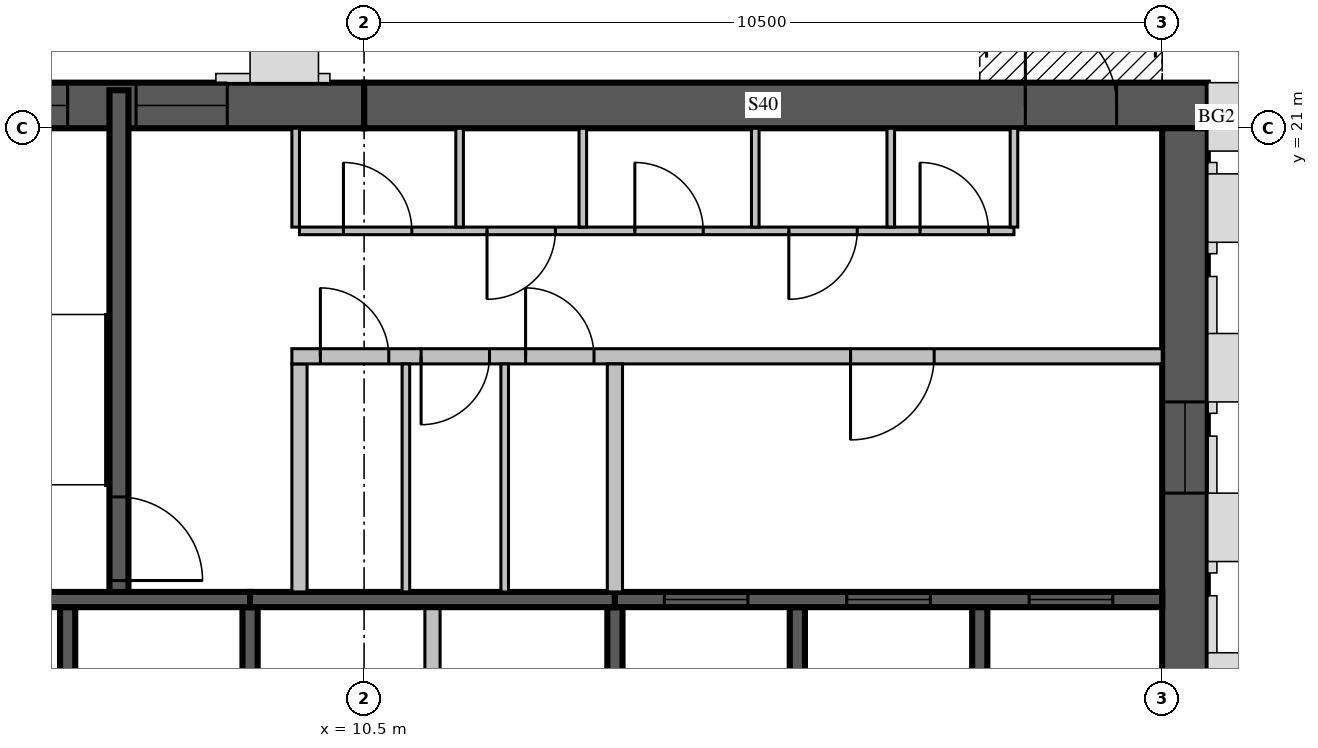
"""IFC4 building model, lengths in metres.
Left out: names, types, materials, properties, quantities, classifications, styles, units other than length and angle.
Written with IfcOpenShell. Run it as: python <this file> out.ifc"""

import sys

from ifc_helpers import new_model, si_unit, direction, frame, frame_2d, origin, place, context, subcontext, project, spatial, rectangle, extrude, source, transform, mapped, element, fill, save


model = new_model("IFC4")
c1 = context("Model", 3, precision=1e-05, world=origin(), true_north=direction((0.0, 1.0)))
c2 = subcontext(c1, "Body", "Model", "MODEL_VIEW")
j1 = project(units=[si_unit("LENGTHUNIT", "METRE"), si_unit("PLANEANGLEUNIT", "RADIAN")], contexts=[c1])
p1 = place(None, origin())
s1 = spatial("IfcSite", under=j1, at=p1, CompositionType="ELEMENT")
p2 = place(p1, origin())
s2 = spatial("IfcBuilding", under=s1, at=p2, CompositionType="ELEMENT")
p3 = place(p2, frame((0.0, 0.0, 316.0)))
s3 = spatial("IfcBuildingStorey", under=s2, at=p3, CompositionType="ELEMENT", Elevation=316.0)
m1 = source(origin(), c2, "Body", "SweptSolid", [
    extrude(rectangle(XDim=11.1, YDim=0.6, at=frame_2d((5.55, 0.0))), origin(), (0.0, 0.0, 1.0), 3.5),
])
p4 = place(p3, frame((10.5, 21.3, 0.0), z_axis=(0.0, 0.0, 1.0), x_axis=(1.0, 0.0, 0.0)))
e1 = element("IfcWall", 1, at=p4, inside=s3, PredefinedType="SHEAR", context=c2, shape_type="MappedRepresentation", body=[
    mapped(m1, transform((0.0, 0.0, 0.0), scale=1.0)),
])
m2 = source(origin(), c2, "Body", "SweptSolid", [
    extrude(rectangle(XDim=1.2, YDim=2.1, at=frame_2d((0.6, 1.05))), frame((0.0, 0.31, 0.0), z_axis=(0.0, -1.0, 0.0), x_axis=(1.0, 0.0, 0.0)), (0.0, 0.0, 1.0), 0.62),
])
p5 = place(p4, frame((8.7, 0.0, 0.0)))
e2 = element("IfcOpeningElement", 2, at=p5, cuts=e1, PredefinedType="OPENING", context=c2, shape_type="MappedRepresentation", body=[
    mapped(m2, transform((0.0, 0.0, 0.0), scale=1.0)),
])
m3 = source(origin(), c2, "Body", "SweptSolid", [
    extrude(rectangle(XDim=10.5, YDim=0.6, at=frame_2d((5.25, 0.0))), origin(), (0.0, 0.0, 1.0), 3.5),
])
p6 = place(p3, frame((21.3, 10.5, 0.0), z_axis=(0.0, 0.0, 1.0), x_axis=(0.0, 1.0, 0.0)))
e3 = element("IfcWall", 3, at=p6, inside=s3, PredefinedType="SHEAR", context=c2, shape_type="MappedRepresentation", body=[
    mapped(m3, transform((0.0, 0.0, 0.0), scale=1.0)),
])
m4 = source(origin(), c2, "Body", "SweptSolid", [
    extrude(rectangle(XDim=1.2, YDim=2.4, at=frame_2d((0.6, 1.2))), frame((0.0, 0.31, 0.0), z_axis=(0.0, -1.0, 0.0), x_axis=(1.0, 0.0, 0.0)), (0.0, 0.0, 1.0), 0.62),
])
p7 = place(p6, frame((5.7, 0.0, 0.6)))
e4 = element("IfcOpeningElement", 4, at=p7, cuts=e3, PredefinedType="OPENING", context=c2, shape_type="MappedRepresentation", body=[
    mapped(m4, transform((0.0, 0.0, 0.0), scale=1.0)),
])
m5 = source(origin(), c2, "Body", "SweptSolid", [
    extrude(rectangle(XDim=6.6, YDim=0.6, at=frame_2d((3.3, 0.0))), origin(), (0.0, 0.0, 1.0), 3.5),
])
p8 = place(p3, frame((3.9, 21.3, 0.0), z_axis=(0.0, 0.0, 1.0), x_axis=(1.0, 0.0, 0.0)))
e5 = element("IfcWall", 5, at=p8, inside=s3, PredefinedType="SHEAR", context=c2, shape_type="MappedRepresentation", body=[
    mapped(m5, transform((0.0, 0.0, 0.0), scale=1.0)),
])
p9 = place(p8, frame((1.5, 0.0, 0.6)))
e6 = element("IfcOpeningElement", 6, at=p9, cuts=e5, PredefinedType="OPENING", context=c2, shape_type="MappedRepresentation", body=[
    mapped(m4, transform((0.0, 0.0, 0.0), scale=1.0)),
])
p10 = place(p8, frame((3.6, 0.0, 0.6)))
e7 = element("IfcOpeningElement", 7, at=p10, cuts=e5, PredefinedType="OPENING", context=c2, shape_type="MappedRepresentation", body=[
    mapped(m4, transform((0.0, 0.0, 0.0), scale=1.0)),
])
m6 = source(origin(), c2, "Body", "SweptSolid", [
    extrude(rectangle(XDim=3.0, YDim=0.2, at=frame_2d((1.5, 0.0))), origin(), (0.0, 0.0, 1.0), 3.5),
])
p11 = place(p3, frame((6.6, 11.7, 0.0), z_axis=(0.0, 0.0, 1.0), x_axis=(0.0, 1.0, 0.0)))
e8 = element("IfcWall", 8, at=p11, inside=s3, PredefinedType="SOLIDWALL", context=c2, shape_type="MappedRepresentation", body=[
    mapped(m6, transform((0.0, 0.0, 0.0), scale=1.0)),
])
m7 = source(origin(), c2, "Body", "SweptSolid", [
    extrude(rectangle(XDim=3.0, YDim=0.2, at=frame_2d((1.5, 0.0))), origin(), (0.0, 0.0, 1.0), 3.1),
])
for number, where, z_axis, x_axis in (
    (9, (9.0, 11.7, 0.0), (0.0, 0.0, 1.0), (0.0, 1.0, 0.0)),
    (10, (13.8, 11.7, 0.0), (0.0, 0.0, 1.0), (0.0, 1.0, 0.0)),
):
    element("IfcWall", number, at=place(p3, frame(where, z_axis=z_axis, x_axis=x_axis)), inside=s3, PredefinedType="SOLIDWALL", context=c2, shape_type="MappedRepresentation", body=[
        mapped(m7, transform((0.0, 0.0, 0.0), scale=1.0)),
    ])
for number, where, z_axis, x_axis in (
    (11, (16.2, 11.7, 0.0), (0.0, 0.0, 1.0), (0.0, 1.0, 0.0)),
    (12, (18.6, 11.7, 0.0), (0.0, 0.0, 1.0), (0.0, 1.0, 0.0)),
):
    element("IfcWall", number, at=place(p3, frame(where, z_axis=z_axis, x_axis=x_axis)), inside=s3, PredefinedType="SOLIDWALL", context=c2, shape_type="MappedRepresentation", body=[
        mapped(m6, transform((0.0, 0.0, 0.0), scale=1.0)),
    ])
m8 = source(origin(), c2, "Body", "SweptSolid", [
    extrude(rectangle(XDim=3.0, YDim=0.2, at=frame_2d((1.5, 0.0))), origin(), (0.0, 0.0, 1.0), 3.1),
])
p12 = place(p3, frame((11.4, 11.7, 0.0), z_axis=(0.0, 0.0, 1.0), x_axis=(0.0, 1.0, 0.0)))
e13 = element("IfcWall", 13, at=p12, inside=s3, PredefinedType="PARTITIONING", context=c2, shape_type="MappedRepresentation", body=[
    mapped(m8, transform((0.0, 0.0, 0.0), scale=1.0)),
])
m9 = source(origin(), c2, "Body", "SweptSolid", [
    extrude(rectangle(XDim=4.8, YDim=0.2, at=frame_2d((2.4, 0.0))), origin(), (0.0, 0.0, 1.0), 3.5),
])
p13 = place(p3, frame((4.2, 14.8, 0.0), z_axis=(0.0, 0.0, 1.0), x_axis=(1.0, 0.0, 0.0)))
e14 = element("IfcWall", 14, at=p13, inside=s3, PredefinedType="SOLIDWALL", context=c2, shape_type="MappedRepresentation", body=[
    mapped(m9, transform((0.0, 0.0, 0.0), scale=1.0)),
])
m10 = source(origin(), c2, "Body", "SweptSolid", [
    extrude(rectangle(XDim=4.8, YDim=0.2, at=frame_2d((2.4, 0.0))), origin(), (0.0, 0.0, 1.0), 3.1),
])
p14 = place(p3, frame((9.0, 14.8, 0.0), z_axis=(0.0, 0.0, 1.0), x_axis=(1.0, 0.0, 0.0)))
e15 = element("IfcWall", 15, at=p14, inside=s3, PredefinedType="SOLIDWALL", context=c2, shape_type="MappedRepresentation", body=[
    mapped(m10, transform((0.0, 0.0, 0.0), scale=1.0)),
])
m11 = source(origin(), c2, "Body", "SweptSolid", [
    extrude(rectangle(XDim=7.2, YDim=0.2, at=frame_2d((3.6, 0.0))), origin(), (0.0, 0.0, 1.0), 3.5),
])
p15 = place(p3, frame((13.8, 14.8, 0.0), z_axis=(0.0, 0.0, 1.0), x_axis=(1.0, 0.0, 0.0)))
e16 = element("IfcWall", 16, at=p15, inside=s3, PredefinedType="SOLIDWALL", context=c2, shape_type="MappedRepresentation", body=[
    mapped(m11, transform((0.0, 0.0, 0.0), scale=1.0)),
])
m12 = source(origin(), c2, "Body", "SweptSolid", [
    extrude(rectangle(XDim=1.1, YDim=2.1, at=frame_2d((0.55, 1.05))), frame((0.0, 0.11, 0.0), z_axis=(0.0, -1.0, 0.0), x_axis=(1.0, 0.0, 0.0)), (0.0, 0.0, 1.0), 0.22),
])
p16 = place(p15, frame((0.65, 0.0, 0.0)))
e17 = element("IfcOpeningElement", 17, at=p16, cuts=e16, PredefinedType="OPENING", context=c2, shape_type="MappedRepresentation", body=[
    mapped(m12, transform((0.0, 0.0, 0.0), scale=1.0)),
])
p17 = place(p15, frame((3.05, 0.0, 0.0)))
e18 = element("IfcOpeningElement", 18, at=p17, cuts=e16, PredefinedType="OPENING", context=c2, shape_type="MappedRepresentation", body=[
    mapped(m12, transform((0.0, 0.0, 0.0), scale=1.0)),
])
p18 = place(p15, frame((5.45, 0.0, 0.0)))
e19 = element("IfcOpeningElement", 19, at=p18, cuts=e16, PredefinedType="OPENING", context=c2, shape_type="MappedRepresentation", body=[
    mapped(m12, transform((0.0, 0.0, 0.0), scale=1.0)),
])
m13 = source(origin(), c2, "Body", "SweptSolid", [
    extrude(rectangle(XDim=6.6, YDim=0.25, at=frame_2d((3.3, 0.0))), origin(), (0.0, 0.0, 1.0), 3.1),
])
p19 = place(p3, frame((7.275, 14.9, 0.0), z_axis=(0.0, 0.0, 1.0), x_axis=(0.0, 1.0, 0.0)))
e20 = element("IfcWall", 20, at=p19, inside=s3, PredefinedType="SOLIDWALL", context=c2, shape_type="MappedRepresentation", body=[
    mapped(m13, transform((0.0, 0.0, 0.0), scale=1.0)),
])
m14 = source(origin(), c2, "Body", "SweptSolid", [
    extrude(rectangle(XDim=1.1, YDim=2.1, at=frame_2d((0.55, 1.05))), frame((0.0, 0.135, 0.0), z_axis=(0.0, -1.0, 0.0), x_axis=(1.0, 0.0, 0.0)), (0.0, 0.0, 1.0), 0.27),
])
p20 = place(p19, frame((0.15, 0.0, 0.0)))
e21 = element("IfcOpeningElement", 21, at=p20, cuts=e20, PredefinedType="OPENING", context=c2, shape_type="MappedRepresentation", body=[
    mapped(m14, transform((0.0, 0.0, 0.0), scale=1.0)),
])
p21 = place(p3, frame((9.65, 14.9, 0.0), z_axis=(0.0, 0.0, 1.0), x_axis=(0.0, 1.0, 0.0)))
e22 = element("IfcWall", 22, at=p21, inside=s3, PredefinedType="PARTITIONING", context=c2, shape_type="MappedRepresentation", body=[
    mapped(m8, transform((0.0, 0.0, 0.0), scale=1.0)),
])
m15 = source(origin(), c2, "Body", "SweptSolid", [
    extrude(rectangle(XDim=11.45, YDim=0.2, at=frame_2d((5.725, 0.0))), origin(), (0.0, 0.0, 1.0), 3.1),
])
p22 = place(p3, frame((9.55, 18.0, 0.0), z_axis=(0.0, 0.0, 1.0), x_axis=(1.0, 0.0, 0.0)))
e23 = element("IfcWall", 23, at=p22, inside=s3, PredefinedType="PARTITIONING", context=c2, shape_type="MappedRepresentation", body=[
    mapped(m15, transform((0.0, 0.0, 0.0), scale=1.0)),
])
m16 = source(origin(), c2, "Body", "SweptSolid", [
    extrude(rectangle(XDim=0.9, YDim=2.1, at=frame_2d((0.45, 1.05))), frame((0.0, 0.11, 0.0), z_axis=(0.0, -1.0, 0.0), x_axis=(1.0, 0.0, 0.0)), (0.0, 0.0, 1.0), 0.22),
])
p23 = place(p22, frame((0.375, 0.0, 0.0)))
e24 = element("IfcOpeningElement", 24, at=p23, cuts=e23, PredefinedType="OPENING", context=c2, shape_type="MappedRepresentation", body=[
    mapped(m16, transform((0.0, 0.0, 0.0), scale=1.0)),
])
p24 = place(p22, frame((1.7, 0.0, 0.0)))
e25 = element("IfcOpeningElement", 25, at=p24, cuts=e23, PredefinedType="OPENING", context=c2, shape_type="MappedRepresentation", body=[
    mapped(m16, transform((0.0, 0.0, 0.0), scale=1.0)),
])
p25 = place(p22, frame((3.075, 0.0, 0.0)))
e26 = element("IfcOpeningElement", 26, at=p25, cuts=e23, PredefinedType="OPENING", context=c2, shape_type="MappedRepresentation", body=[
    mapped(m16, transform((0.0, 0.0, 0.0), scale=1.0)),
])
p26 = place(p22, frame((7.35, 0.0, 0.0)))
e27 = element("IfcOpeningElement", 27, at=p26, cuts=e23, PredefinedType="OPENING", context=c2, shape_type="MappedRepresentation", body=[
    mapped(m12, transform((0.0, 0.0, 0.0), scale=1.0)),
])
m17 = source(origin(), c2, "Body", "SweptSolid", [
    extrude(rectangle(XDim=9.4, YDim=0.1, at=frame_2d((4.7, 0.0))), origin(), (0.0, 0.0, 1.0), 3.1),
])
p27 = place(p3, frame((9.65, 19.65, 0.0), z_axis=(0.0, 0.0, 1.0), x_axis=(1.0, 0.0, 0.0)))
e28 = element("IfcWall", 28, at=p27, inside=s3, PredefinedType="PARTITIONING", context=c2, shape_type="MappedRepresentation", body=[
    mapped(m17, transform((0.0, 0.0, 0.0), scale=1.0)),
])
m18 = source(origin(), c2, "Body", "SweptSolid", [
    extrude(rectangle(XDim=0.9, YDim=2.1, at=frame_2d((0.45, 1.05))), frame((0.0, 0.06, 0.0), z_axis=(0.0, -1.0, 0.0), x_axis=(1.0, 0.0, 0.0)), (0.0, 0.0, 1.0), 0.12),
])
p28 = place(p27, frame((0.578, 0.0, 0.0)))
e29 = element("IfcOpeningElement", 29, at=p28, cuts=e28, PredefinedType="OPENING", context=c2, shape_type="MappedRepresentation", body=[
    mapped(m18, transform((0.0, 0.0, 0.0), scale=1.0)),
])
p29 = place(p27, frame((2.467, 0.0, 0.0)))
e30 = element("IfcOpeningElement", 30, at=p29, cuts=e28, PredefinedType="OPENING", context=c2, shape_type="MappedRepresentation", body=[
    mapped(m18, transform((0.0, 0.0, 0.0), scale=1.0)),
])
p30 = place(p27, frame((4.412, 0.0, 0.0)))
e31 = element("IfcOpeningElement", 31, at=p30, cuts=e28, PredefinedType="OPENING", context=c2, shape_type="MappedRepresentation", body=[
    mapped(m18, transform((0.0, 0.0, 0.0), scale=1.0)),
])
p31 = place(p27, frame((6.438, 0.0, 0.0)))
e32 = element("IfcOpeningElement", 32, at=p31, cuts=e28, PredefinedType="OPENING", context=c2, shape_type="MappedRepresentation", body=[
    mapped(m18, transform((0.0, 0.0, 0.0), scale=1.0)),
])
p32 = place(p27, frame((8.165, 0.0, 0.0)))
e33 = element("IfcOpeningElement", 33, at=p32, cuts=e28, PredefinedType="OPENING", context=c2, shape_type="MappedRepresentation", body=[
    mapped(m18, transform((0.0, 0.0, 0.0), scale=1.0)),
])
m19 = source(origin(), c2, "Body", "SweptSolid", [
    extrude(rectangle(XDim=1.3, YDim=0.1, at=frame_2d((0.65, 0.0))), origin(), (0.0, 0.0, 1.0), 3.1),
])
for number, where, z_axis, x_axis in (
    (34, (11.757, 19.7, 0.0), (0.0, 0.0, 1.0), (0.0, 1.0, 0.0)),
    (35, (13.378, 19.7, 0.0), (0.0, 0.0, 1.0), (0.0, 1.0, 0.0)),
    (36, (15.647, 19.7, 0.0), (0.0, 0.0, 1.0), (0.0, 1.0, 0.0)),
    (37, (17.429, 19.7, 0.0), (0.0, 0.0, 1.0), (0.0, 1.0, 0.0)),
    (38, (9.6, 19.7, 0.0), (0.0, 0.0, 1.0), (0.0, 1.0, 0.0)),
    (39, (19.05, 19.7, 0.0), (0.0, 0.0, 1.0), (0.0, 1.0, 0.0)),
):
    element("IfcWall", number, at=place(p3, frame(where, z_axis=z_axis, x_axis=x_axis)), inside=s3, PredefinedType="PARTITIONING", context=c2, shape_type="MappedRepresentation", body=[
        mapped(m19, transform((0.0, 0.0, 0.0), scale=1.0)),
    ])
p33 = place(p3, frame((13.8, 14.9, 0.0), z_axis=(0.0, 0.0, 1.0), x_axis=(0.0, 1.0, 0.0)))
e40 = element("IfcWall", 40, at=p33, inside=s3, PredefinedType="PARTITIONING", context=c2, shape_type="MappedRepresentation", body=[
    mapped(m8, transform((0.0, 0.0, 0.0), scale=1.0)),
])
m20 = source(origin(), c2, "Body", "SweptSolid", [
    extrude(rectangle(XDim=3.0, YDim=0.1, at=frame_2d((1.5, 0.0))), origin(), (0.0, 0.0, 1.0), 3.1),
])
for number, where, z_axis, x_axis in (
    (41, (11.05, 14.9, 0.0), (0.0, 0.0, 1.0), (0.0, 1.0, 0.0)),
    (42, (12.35, 14.9, 0.0), (0.0, 0.0, 1.0), (0.0, 1.0, 0.0)),
):
    element("IfcWall", number, at=place(p3, frame(where, z_axis=z_axis, x_axis=x_axis)), inside=s3, PredefinedType="PARTITIONING", context=c2, shape_type="MappedRepresentation", body=[
        mapped(m20, transform((0.0, 0.0, 0.0), scale=1.0)),
    ])
m21 = source(origin(), c2, "Body", "SweptSolid", [
    extrude(rectangle(XDim=1.1, YDim=2.1, at=frame_2d((0.55, 1.05))), frame((0.0, 0.025, 0.0), z_axis=(0.0, -1.0, 0.0), x_axis=(1.0, 0.0, 0.0)), (0.0, 0.0, 1.0), 0.05),
])
p34 = place(p16, origin())
e43 = element("IfcDoor", 43, at=p34, inside=s3, OperationType="SLIDING_TO_LEFT", PredefinedType="DOOR", context=c2, shape_type="MappedRepresentation", body=[
    mapped(m21, transform((0.0, 0.0, 0.0), scale=1.0)),
])
fill(e17, e43)
p35 = place(p17, origin())
e44 = element("IfcDoor", 44, at=p35, inside=s3, OperationType="SLIDING_TO_LEFT", PredefinedType="DOOR", context=c2, shape_type="MappedRepresentation", body=[
    mapped(m21, transform((0.0, 0.0, 0.0), scale=1.0)),
])
fill(e18, e44)
p36 = place(p18, origin())
e45 = element("IfcDoor", 45, at=p36, inside=s3, OperationType="SLIDING_TO_LEFT", PredefinedType="DOOR", context=c2, shape_type="MappedRepresentation", body=[
    mapped(m21, transform((0.0, 0.0, 0.0), scale=1.0)),
])
fill(e19, e45)
p37 = place(p20, origin())
e46 = element("IfcDoor", 46, at=p37, inside=s3, OperationType="SINGLE_SWING_RIGHT", PredefinedType="DOOR", context=c2, shape_type="MappedRepresentation", body=[
    mapped(m21, transform((0.0, 0.0, 0.0), scale=1.0)),
])
fill(e21, e46)
m22 = source(origin(), c2, "Body", "SweptSolid", [
    extrude(rectangle(XDim=0.9, YDim=2.1, at=frame_2d((0.45, 1.05))), frame((0.0, 0.025, 0.0), z_axis=(0.0, -1.0, 0.0), x_axis=(1.0, 0.0, 0.0)), (0.0, 0.0, 1.0), 0.05),
])
p38 = place(p23, origin())
e47 = element("IfcDoor", 47, at=p38, inside=s3, OperationType="SINGLE_SWING_LEFT", PredefinedType="DOOR", context=c2, shape_type="MappedRepresentation", body=[
    mapped(m22, transform((0.0, 0.0, 0.0), scale=1.0)),
])
fill(e24, e47)
p39 = place(p24, origin())
e48 = element("IfcDoor", 48, at=p39, inside=s3, OperationType="SINGLE_SWING_RIGHT", PredefinedType="DOOR", context=c2, shape_type="MappedRepresentation", body=[
    mapped(m22, transform((0.0, 0.0, 0.0), scale=1.0)),
])
fill(e25, e48)
p40 = place(p25, origin())
e49 = element("IfcDoor", 49, at=p40, inside=s3, OperationType="SINGLE_SWING_LEFT", PredefinedType="DOOR", context=c2, shape_type="MappedRepresentation", body=[
    mapped(m22, transform((0.0, 0.0, 0.0), scale=1.0)),
])
fill(e26, e49)
p41 = place(p26, origin())
e50 = element("IfcDoor", 50, at=p41, inside=s3, OperationType="SINGLE_SWING_RIGHT", PredefinedType="DOOR", context=c2, shape_type="MappedRepresentation", body=[
    mapped(m21, transform((0.0, 0.0, 0.0), scale=1.0)),
])
fill(e27, e50)
p42 = place(p28, origin())
e51 = element("IfcDoor", 51, at=p42, inside=s3, OperationType="SINGLE_SWING_LEFT", PredefinedType="DOOR", context=c2, shape_type="MappedRepresentation", body=[
    mapped(m22, transform((0.0, 0.0, 0.0), scale=1.0)),
])
fill(e29, e51)
p43 = place(p29, origin())
e52 = element("IfcDoor", 52, at=p43, inside=s3, OperationType="SINGLE_SWING_RIGHT", PredefinedType="DOOR", context=c2, shape_type="MappedRepresentation", body=[
    mapped(m22, transform((0.0, 0.0, 0.0), scale=1.0)),
])
fill(e30, e52)
p44 = place(p30, origin())
e53 = element("IfcDoor", 53, at=p44, inside=s3, OperationType="SINGLE_SWING_LEFT", PredefinedType="DOOR", context=c2, shape_type="MappedRepresentation", body=[
    mapped(m22, transform((0.0, 0.0, 0.0), scale=1.0)),
])
fill(e31, e53)
p45 = place(p31, origin())
e54 = element("IfcDoor", 54, at=p45, inside=s3, OperationType="SINGLE_SWING_RIGHT", PredefinedType="DOOR", context=c2, shape_type="MappedRepresentation", body=[
    mapped(m22, transform((0.0, 0.0, 0.0), scale=1.0)),
])
fill(e32, e54)
p46 = place(p32, origin())
e55 = element("IfcDoor", 55, at=p46, inside=s3, OperationType="SINGLE_SWING_LEFT", PredefinedType="DOOR", context=c2, shape_type="MappedRepresentation", body=[
    mapped(m22, transform((0.0, 0.0, 0.0), scale=1.0)),
])
fill(e33, e55)
m23 = source(origin(), c2, "Body", "SweptSolid", [
    extrude(rectangle(XDim=1.2, YDim=2.1, at=frame_2d((0.6, 1.05))), frame((0.0, 0.025, 0.0), z_axis=(0.0, -1.0, 0.0), x_axis=(1.0, 0.0, 0.0)), (0.0, 0.0, 1.0), 0.05),
])
p47 = place(p5, origin())
e56 = element("IfcDoor", 56, at=p47, inside=s3, OperationType="SINGLE_SWING_LEFT", PredefinedType="DOOR", context=c2, shape_type="MappedRepresentation", body=[
    mapped(m23, transform((0.0, 0.0, 0.0), scale=1.0)),
])
fill(e2, e56)
m24 = source(origin(), c2, "Body", "SweptSolid", [
    extrude(rectangle(XDim=1.2, YDim=2.4, at=frame_2d((0.6, 1.2))), frame((0.0, 0.03, 0.0), z_axis=(0.0, -1.0, 0.0), x_axis=(1.0, 0.0, 0.0)), (0.0, 0.0, 1.0), 0.06),
])
p48 = place(p7, origin())
e57 = element("IfcWindow", 57, at=p48, inside=s3, PartitioningType="SINGLE_PANEL", PredefinedType="WINDOW", context=c2, shape_type="MappedRepresentation", body=[
    mapped(m24, transform((0.0, 0.0, 0.0), scale=1.0)),
])
fill(e4, e57)
p49 = place(p9, origin())
e58 = element("IfcWindow", 58, at=p49, inside=s3, PartitioningType="SINGLE_PANEL", PredefinedType="WINDOW", context=c2, shape_type="MappedRepresentation", body=[
    mapped(m24, transform((0.0, 0.0, 0.0), scale=1.0)),
])
fill(e6, e58)
p50 = place(p10, origin())
e59 = element("IfcWindow", 59, at=p50, inside=s3, PartitioningType="SINGLE_PANEL", PredefinedType="WINDOW", context=c2, shape_type="MappedRepresentation", body=[
    mapped(m24, transform((0.0, 0.0, 0.0), scale=1.0)),
])
fill(e7, e59)
save(model, sys.argv[1])
